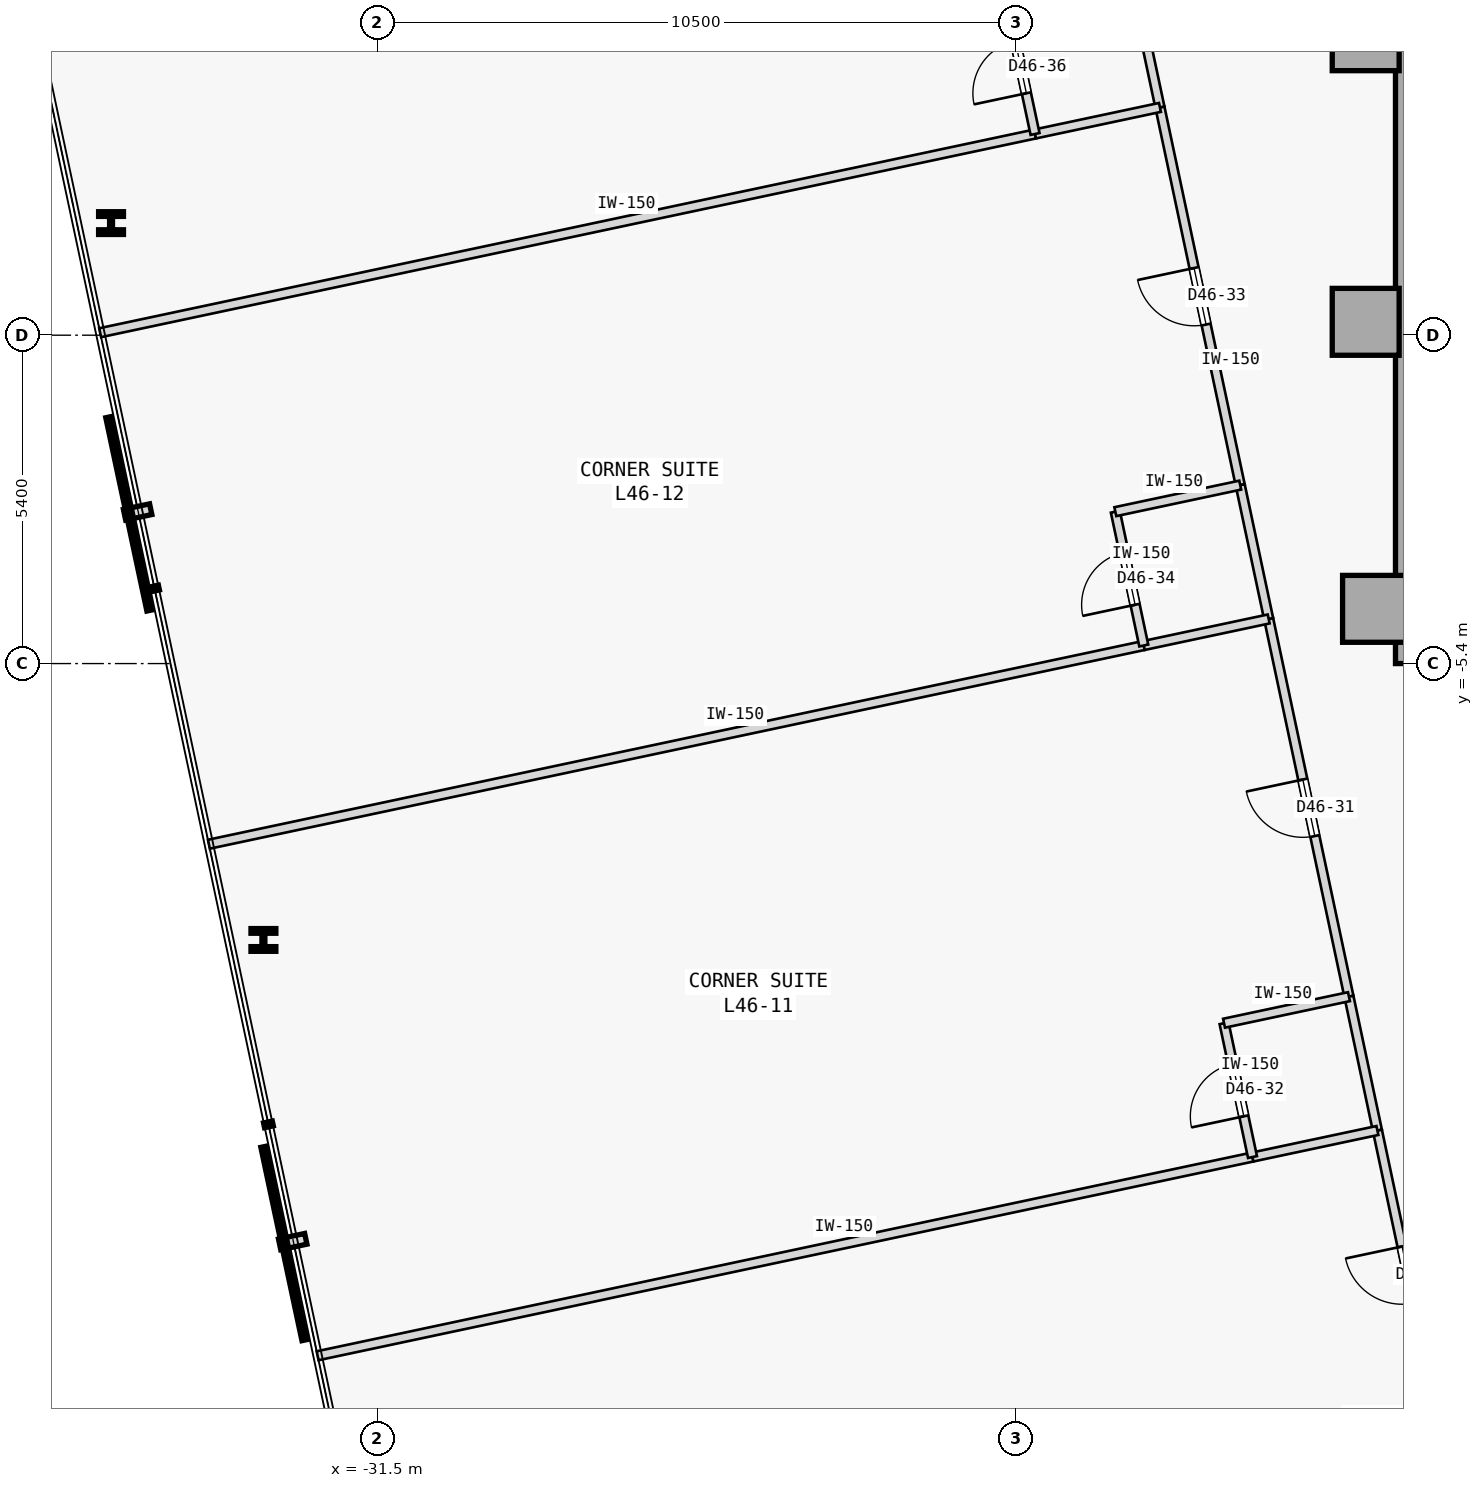
"""IFC4 building model, lengths in metres.
Left out: names, types, materials, properties, quantities, classifications, styles, units other than length and angle.
Written with IfcOpenShell. Run it as: python <this file> out.ifc"""

import sys

from ifc_helpers import new_model, si_unit, direction, frame, frame_2d, origin, origin_2d, place, context, subcontext, project, spatial, rectangle, i_section, extrude, element, fill, save


model = new_model("IFC4")
c1 = context("Model", 3, precision=1e-05, world=origin(), true_north=direction((0.0, 1.0)))
c2 = subcontext(c1, "Body", "Model", "MODEL_VIEW")
j1 = project(units=[si_unit("LENGTHUNIT", "METRE"), si_unit("PLANEANGLEUNIT", "RADIAN")], contexts=[c1])
p1 = place(None, origin())
s1 = spatial("IfcSite", under=j1, at=p1, CompositionType="ELEMENT")
p2 = place(p1, origin())
s2 = spatial("IfcBuilding", under=s1, at=p2, CompositionType="ELEMENT")
p3 = place(p2, frame((0.0, 0.0, 178.6)))
s3 = spatial("IfcBuildingStorey", under=s2, at=p3, CompositionType="ELEMENT", Elevation=178.6)
for number, where, z_axis, x_axis in (
    (1, (-15.25, 4.9, 0.0), (0.0, 0.0, 1.0), (1.0, 0.0, 0.0)),
    (2, (-15.25, 0.22, 0.0), (0.0, 0.0, 1.0), (1.0, 0.0, 0.0)),
    (3, (-15.08, -4.5, 0.0), (0.0, 0.0, 1.0), (1.0, 0.0, 0.0)),
):
    element("IfcColumn", number, at=place(p3, frame(where, z_axis=z_axis, x_axis=x_axis)), inside=s3, PredefinedType="COLUMN", context=c2, shape_type="SweptSolid", body=[
        extrude(rectangle(XDim=1.1, YDim=1.1, at=origin_2d()), origin(), (0.0, 0.0, 1.0), 3.4),
    ])
p4 = place(p3, frame((-14.56, -5.4, 0.0), z_axis=(0.0, 0.0, 1.0), x_axis=(0.0, 1.0, 0.0)))
e4 = element("IfcWall", 4, at=p4, inside=s3, PredefinedType="SHEAR", context=c2, shape_type="SweptSolid", body=[
    extrude(rectangle(XDim=10.8, YDim=0.4, at=frame_2d((5.4, 0.0))), origin(), (0.0, 0.0, 1.0), 3.175),
])
for number, where, z_axis, x_axis in (
    (5, (-35.883, 1.844, 0.0), (0.0, 0.0, 1.0), (1.0, 0.0, 0.0)),
    (6, (-33.377, -9.945, 0.0), (0.0, 0.0, 1.0), (1.0, 0.0, 0.0)),
):
    element("IfcColumn", number, at=place(p3, frame(where, z_axis=z_axis, x_axis=x_axis)), inside=s3, PredefinedType="COLUMN", context=c2, shape_type="SweptSolid", body=[
        extrude(i_section(OverallWidth=0.409, OverallDepth=0.374, WebThickness=0.048, FlangeThickness=0.077, FilletRadius=0.015, at=origin_2d()), origin(), (0.0, 0.0, 1.0), 3.4),
    ])
p5 = place(p3, frame((-14.049, -17.823, 0.0), z_axis=(0.0, 0.0, 1.0), x_axis=(-0.2079027059, 0.978149510494, 0.0)))
e7 = element("IfcWall", 7, at=p5, inside=s3, PredefinedType="PARTITIONING", context=c2, shape_type="SweptSolid", body=[
    extrude(rectangle(XDim=4.85, YDim=0.15, at=frame_2d((2.425, 0.0))), origin(), (0.0, 0.0, 1.0), 3.175),
])
p6 = place(p5, frame((1.95, 0.0, 0.0)))
e8 = element("IfcOpeningElement", 8, at=p6, cuts=e7, PredefinedType="OPENING", context=c2, shape_type="SweptSolid", body=[
    extrude(rectangle(XDim=0.95, YDim=2.15, at=frame_2d((0.475, 1.075))), frame((0.0, 0.085, 0.0), z_axis=(0.0, -1.0, 0.0), x_axis=(1.0, 0.0, 0.0)), (0.0, 0.0, 1.0), 0.17),
])
p7 = place(p3, frame((-15.525, -10.878, 0.0), z_axis=(0.0, 0.0, 1.0), x_axis=(-0.207887725283, 0.978152694459, 0.0)))
e9 = element("IfcWall", 9, at=p7, inside=s3, PredefinedType="PARTITIONING", context=c2, shape_type="SweptSolid", body=[
    extrude(rectangle(XDim=6.35, YDim=0.15, at=frame_2d((3.175, 0.0))), origin(), (0.0, 0.0, 1.0), 3.175),
])
p8 = place(p7, frame((2.7, 0.0, 0.0)))
e10 = element("IfcOpeningElement", 10, at=p8, cuts=e9, PredefinedType="OPENING", context=c2, shape_type="SweptSolid", body=[
    extrude(rectangle(XDim=0.95, YDim=2.15, at=frame_2d((0.475, 1.075))), frame((0.0, 0.085, 0.0), z_axis=(0.0, -1.0, 0.0), x_axis=(1.0, 0.0, 0.0)), (0.0, 0.0, 1.0), 0.17),
])
p9 = place(p3, frame((-15.057, -13.079, 0.0), z_axis=(0.0, 0.0, 1.0), x_axis=(-0.207995007687, 0.978129887478, 0.0)))
e11 = element("IfcWall", 11, at=p9, inside=s3, PredefinedType="PARTITIONING", context=c2, shape_type="SweptSolid", body=[
    extrude(rectangle(XDim=2.25, YDim=0.15, at=frame_2d((1.125, 0.0))), origin(), (0.0, 0.0, 1.0), 3.175),
])
p10 = place(p3, frame((-17.313, -2.466, 0.0), z_axis=(0.0, 0.0, 1.0), x_axis=(-0.207916691923, 0.978146537703, 0.0)))
e12 = element("IfcWall", 12, at=p10, inside=s3, PredefinedType="PARTITIONING", context=c2, shape_type="SweptSolid", body=[
    extrude(rectangle(XDim=6.35, YDim=0.15, at=frame_2d((3.175, 0.0))), origin(), (0.0, 0.0, 1.0), 3.175),
])
p11 = place(p10, frame((2.7, 0.0, 0.0)))
e13 = element("IfcOpeningElement", 13, at=p11, cuts=e12, PredefinedType="OPENING", context=c2, shape_type="SweptSolid", body=[
    extrude(rectangle(XDim=0.95, YDim=2.15, at=frame_2d((0.475, 1.075))), frame((0.0, 0.085, 0.0), z_axis=(0.0, -1.0, 0.0), x_axis=(1.0, 0.0, 0.0)), (0.0, 0.0, 1.0), 0.17),
])
for number, where, z_axis, x_axis in (
    (14, (-16.845, -4.667, 0.0), (0.0, 0.0, 1.0), (-0.208, 0.978, 0.0)),
    (15, (-18.633, 3.746, 0.0), (0.0, 0.0, 1.0), (-0.208, 0.978, 0.0)),
):
    element("IfcWall", number, at=place(p3, frame(where, z_axis=z_axis, x_axis=x_axis)), inside=s3, PredefinedType="PARTITIONING", context=c2, shape_type="SweptSolid", body=[
        extrude(rectangle(XDim=2.25, YDim=0.15, at=frame_2d((1.125, 0.0))), origin(), (0.0, 0.0, 1.0), 3.175),
    ])
p12 = place(p3, frame((-32.486, -16.783, 0.0), z_axis=(0.0, 0.0, 1.0), x_axis=(0.978146137903, 0.207918572776, 0.0)))
e16 = element("IfcWall", 16, at=p12, inside=s3, PredefinedType="PARTITIONING", context=c2, shape_type="SweptSolid", body=[
    extrude(rectangle(XDim=15.718, YDim=0.15, at=frame_2d((7.859, 0.0))), origin(), (0.0, 0.0, 1.0), 3.175),
])
p13 = place(p3, frame((-17.111, -13.515, 0.0), z_axis=(0.0, 0.0, 1.0), x_axis=(0.97815826, 0.207861536591, 0.0)))
e17 = element("IfcWall", 17, at=p13, inside=s3, PredefinedType="PARTITIONING", context=c2, shape_type="SweptSolid", body=[
    extrude(rectangle(XDim=2.1, YDim=0.15, at=frame_2d((1.05, 0.0))), origin(), (0.0, 0.0, 1.0), 3.175),
])
p14 = place(p3, frame((-17.111, -13.515, 0.0), z_axis=(0.0, 0.0, 1.0), x_axis=(-0.207913264065, 0.978147266328, 0.0)))
e18 = element("IfcWall", 18, at=p14, inside=s3, PredefinedType="PARTITIONING", context=c2, shape_type="SweptSolid", body=[
    extrude(rectangle(XDim=2.25, YDim=0.15, at=frame_2d((1.125, 0.0))), origin(), (0.0, 0.0, 1.0), 3.175),
])
p15 = place(p14, frame((0.685, 0.0, 0.0)))
e19 = element("IfcOpeningElement", 19, at=p15, cuts=e18, PredefinedType="OPENING", context=c2, shape_type="SweptSolid", body=[
    extrude(rectangle(XDim=0.88, YDim=2.15, at=frame_2d((0.44, 1.075))), frame((0.0, 0.085, 0.0), z_axis=(0.0, -1.0, 0.0), x_axis=(1.0, 0.0, 0.0)), (0.0, 0.0, 1.0), 0.17),
])
p16 = place(p3, frame((-17.579, -11.314, 0.0), z_axis=(0.0, 0.0, 1.0), x_axis=(0.978129588365, 0.207996414309, 0.0)))
e20 = element("IfcWall", 20, at=p16, inside=s3, PredefinedType="PARTITIONING", context=c2, shape_type="SweptSolid", body=[
    extrude(rectangle(XDim=2.1, YDim=0.15, at=frame_2d((1.05, 0.0))), origin(), (0.0, 0.0, 1.0), 3.175),
])
p17 = place(p3, frame((-34.274, -8.371, 0.0), z_axis=(0.0, 0.0, 1.0), x_axis=(0.978146137903, 0.207918572776, 0.0)))
e21 = element("IfcWall", 21, at=p17, inside=s3, PredefinedType="PARTITIONING", context=c2, shape_type="SweptSolid", body=[
    extrude(rectangle(XDim=15.718, YDim=0.15, at=frame_2d((7.859, 0.0))), origin(), (0.0, 0.0, 1.0), 3.175),
])
p18 = place(p3, frame((-18.899, -5.103, 0.0), z_axis=(0.0, 0.0, 1.0), x_axis=(0.97815826, 0.207861536591, 0.0)))
e22 = element("IfcWall", 22, at=p18, inside=s3, PredefinedType="PARTITIONING", context=c2, shape_type="SweptSolid", body=[
    extrude(rectangle(XDim=2.1, YDim=0.15, at=frame_2d((1.05, 0.0))), origin(), (0.0, 0.0, 1.0), 3.175),
])
p19 = place(p3, frame((-18.899, -5.103, 0.0), z_axis=(0.0, 0.0, 1.0), x_axis=(-0.207913264065, 0.978147266328, 0.0)))
e23 = element("IfcWall", 23, at=p19, inside=s3, PredefinedType="PARTITIONING", context=c2, shape_type="SweptSolid", body=[
    extrude(rectangle(XDim=2.25, YDim=0.15, at=frame_2d((1.125, 0.0))), origin(), (0.0, 0.0, 1.0), 3.175),
])
p20 = place(p19, frame((0.685, 0.0, 0.0)))
e24 = element("IfcOpeningElement", 24, at=p20, cuts=e23, PredefinedType="OPENING", context=c2, shape_type="SweptSolid", body=[
    extrude(rectangle(XDim=0.88, YDim=2.15, at=frame_2d((0.44, 1.075))), frame((0.0, 0.085, 0.0), z_axis=(0.0, -1.0, 0.0), x_axis=(1.0, 0.0, 0.0)), (0.0, 0.0, 1.0), 0.17),
])
p21 = place(p3, frame((-19.367, -2.902, 0.0), z_axis=(0.0, 0.0, 1.0), x_axis=(0.97815826, 0.207861536591, 0.0)))
e25 = element("IfcWall", 25, at=p21, inside=s3, PredefinedType="PARTITIONING", context=c2, shape_type="SweptSolid", body=[
    extrude(rectangle(XDim=2.1, YDim=0.15, at=frame_2d((1.05, 0.0))), origin(), (0.0, 0.0, 1.0), 3.175),
])
p22 = place(p3, frame((-36.062, 0.041, 0.0), z_axis=(0.0, 0.0, 1.0), x_axis=(0.978149296727, 0.207903711638, 0.0)))
e26 = element("IfcWall", 26, at=p22, inside=s3, PredefinedType="PARTITIONING", context=c2, shape_type="SweptSolid", body=[
    extrude(rectangle(XDim=15.718, YDim=0.15, at=frame_2d((7.859, 0.0))), origin(), (0.0, 0.0, 1.0), 3.175),
])
p23 = place(p3, frame((-20.688, 3.309, 0.0), z_axis=(0.0, 0.0, 1.0), x_axis=(0.978134617382, 0.207972763311, 0.0)))
e27 = element("IfcWall", 27, at=p23, inside=s3, PredefinedType="PARTITIONING", context=c2, shape_type="SweptSolid", body=[
    extrude(rectangle(XDim=2.1, YDim=0.15, at=frame_2d((1.05, 0.0))), origin(), (0.0, 0.0, 1.0), 3.175),
])
p24 = place(p3, frame((-20.688, 3.309, 0.0), z_axis=(0.0, 0.0, 1.0), x_axis=(-0.207891197838, 0.978151956427, 0.0)))
e28 = element("IfcWall", 28, at=p24, inside=s3, PredefinedType="PARTITIONING", context=c2, shape_type="SweptSolid", body=[
    extrude(rectangle(XDim=2.25, YDim=0.15, at=frame_2d((1.125, 0.0))), origin(), (0.0, 0.0, 1.0), 3.175),
])
p25 = place(p24, frame((0.685, 0.0, 0.0)))
e29 = element("IfcOpeningElement", 29, at=p25, cuts=e28, PredefinedType="OPENING", context=c2, shape_type="SweptSolid", body=[
    extrude(rectangle(XDim=0.88, YDim=2.15, at=frame_2d((0.44, 1.075))), frame((0.0, 0.085, 0.0), z_axis=(0.0, -1.0, 0.0), x_axis=(1.0, 0.0, 0.0)), (0.0, 0.0, 1.0), 0.17),
])
p26 = place(p6, origin())
e30 = element("IfcDoor", 30, at=p26, inside=s3, OperationType="SINGLE_SWING_RIGHT", PredefinedType="DOOR", context=c2, shape_type="SweptSolid", body=[
    extrude(rectangle(XDim=0.95, YDim=2.15, at=frame_2d((0.475, 1.075))), frame((0.0, 0.025, 0.0), z_axis=(0.0, -1.0, 0.0), x_axis=(1.0, 0.0, 0.0)), (0.0, 0.0, 1.0), 0.05),
])
fill(e8, e30)
p27 = place(p8, origin())
e31 = element("IfcDoor", 31, at=p27, inside=s3, OperationType="SINGLE_SWING_RIGHT", PredefinedType="DOOR", context=c2, shape_type="SweptSolid", body=[
    extrude(rectangle(XDim=0.95, YDim=2.15, at=frame_2d((0.475, 1.075))), frame((0.0, 0.025, 0.0), z_axis=(0.0, -1.0, 0.0), x_axis=(1.0, 0.0, 0.0)), (0.0, 0.0, 1.0), 0.05),
])
fill(e10, e31)
p28 = place(p15, origin())
e32 = element("IfcDoor", 32, at=p28, inside=s3, OperationType="SINGLE_SWING_LEFT", PredefinedType="DOOR", context=c2, shape_type="SweptSolid", body=[
    extrude(rectangle(XDim=0.88, YDim=2.15, at=frame_2d((0.44, 1.075))), frame((0.0, 0.025, 0.0), z_axis=(0.0, -1.0, 0.0), x_axis=(1.0, 0.0, 0.0)), (0.0, 0.0, 1.0), 0.05),
])
fill(e19, e32)
p29 = place(p11, origin())
e33 = element("IfcDoor", 33, at=p29, inside=s3, OperationType="SINGLE_SWING_RIGHT", PredefinedType="DOOR", context=c2, shape_type="SweptSolid", body=[
    extrude(rectangle(XDim=0.95, YDim=2.15, at=frame_2d((0.475, 1.075))), frame((0.0, 0.025, 0.0), z_axis=(0.0, -1.0, 0.0), x_axis=(1.0, 0.0, 0.0)), (0.0, 0.0, 1.0), 0.05),
])
fill(e13, e33)
p30 = place(p20, origin())
e34 = element("IfcDoor", 34, at=p30, inside=s3, OperationType="SINGLE_SWING_LEFT", PredefinedType="DOOR", context=c2, shape_type="SweptSolid", body=[
    extrude(rectangle(XDim=0.88, YDim=2.15, at=frame_2d((0.44, 1.075))), frame((0.0, 0.025, 0.0), z_axis=(0.0, -1.0, 0.0), x_axis=(1.0, 0.0, 0.0)), (0.0, 0.0, 1.0), 0.05),
])
fill(e24, e34)
p31 = place(p25, origin())
e35 = element("IfcDoor", 35, at=p31, inside=s3, OperationType="SINGLE_SWING_LEFT", PredefinedType="DOOR", context=c2, shape_type="SweptSolid", body=[
    extrude(rectangle(XDim=0.88, YDim=2.15, at=frame_2d((0.44, 1.075))), frame((0.0, 0.025, 0.0), z_axis=(0.0, -1.0, 0.0), x_axis=(1.0, 0.0, 0.0)), (0.0, 0.0, 1.0), 0.05),
])
fill(e29, e35)
save(model, sys.argv[1])
